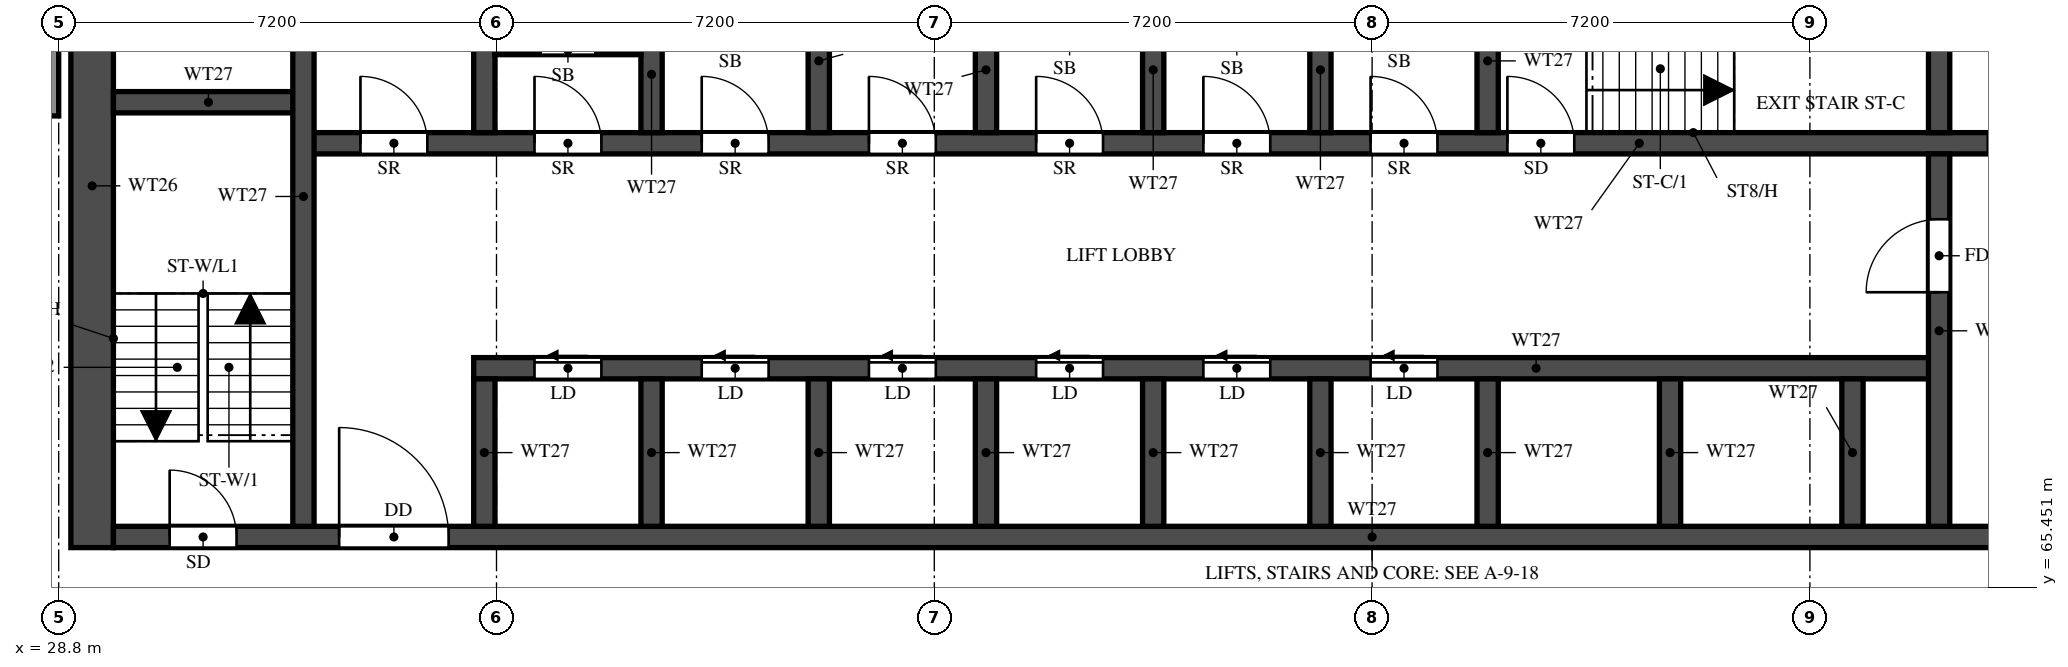
"""IFC4 building model, lengths in metres.
Left out: names, types, materials, properties, quantities, classifications, styles, units other than length and angle.
Written with IfcOpenShell. Run it as: python <this file> out.ifc"""

import sys

from ifc_helpers import new_model, si_unit, direction, frame, frame_2d, origin, place, context, subcontext, project, spatial, rectangle, extrude, element, fill, save


model = new_model("IFC4")
c1 = context("Model", 3, precision=1e-05, world=origin(), true_north=direction((0.0, 1.0)))
c2 = subcontext(c1, "Body", "Model", "MODEL_VIEW")
j1 = project(units=[si_unit("LENGTHUNIT", "METRE"), si_unit("PLANEANGLEUNIT", "RADIAN")], contexts=[c1])
p1 = place(None, origin())
s1 = spatial("IfcSite", under=j1, at=p1, CompositionType="ELEMENT")
p2 = place(p1, origin())
s2 = spatial("IfcBuilding", under=s1, at=p2, CompositionType="ELEMENT")
p3 = place(p2, frame((0.0, 0.0, 123.5)))
s3 = spatial("IfcBuildingStorey", under=s2, at=p3, CompositionType="ELEMENT", Elevation=123.5)
p4 = place(p3, frame((29.35, 66.1, 0.0), z_axis=(0.0, 0.0, 1.0), x_axis=(0.0, 1.0, 0.0)))
e1 = element("IfcWall", 1, at=p4, inside=s3, PredefinedType="SHEAR", context=c2, shape_type="SweptSolid", body=[
    extrude(rectangle(XDim=11.9, YDim=0.7, at=frame_2d((5.95, 0.0))), origin(), (0.0, 0.0, 1.0), 3.2),
])
p5 = place(p3, frame((29.7, 66.275, 0.0), z_axis=(0.0, 0.0, 1.0), x_axis=(1.0, 0.0, 0.0)))
e2 = element("IfcWall", 2, at=p5, inside=s3, PredefinedType="SHEAR", context=c2, shape_type="SweptSolid", body=[
    extrude(rectangle(XDim=41.4, YDim=0.35, at=frame_2d((20.7, 0.0))), origin(), (0.0, 0.0, 1.0), 3.2),
])
p6 = place(p5, frame((0.925, 0.0, 0.0)))
e3 = element("IfcOpeningElement", 3, at=p6, cuts=e2, PredefinedType="OPENING", context=c2, shape_type="SweptSolid", body=[
    extrude(rectangle(XDim=1.1, YDim=2.1, at=frame_2d((0.55, 1.05))), frame((0.0, 0.185, 0.0), z_axis=(0.0, -1.0, 0.0), x_axis=(1.0, 0.0, 0.0)), (0.0, 0.0, 1.0), 0.37),
])
p7 = place(p5, frame((3.712, 0.0, 0.0)))
e4 = element("IfcOpeningElement", 4, at=p7, cuts=e2, PredefinedType="OPENING", context=c2, shape_type="SweptSolid", body=[
    extrude(rectangle(XDim=1.8, YDim=2.1, at=frame_2d((0.9, 1.05))), frame((0.0, 0.185, 0.0), z_axis=(0.0, -1.0, 0.0), x_axis=(1.0, 0.0, 0.0)), (0.0, 0.0, 1.0), 0.37),
])
p8 = place(p3, frame((35.625, 69.05, 0.0), z_axis=(0.0, 0.0, 1.0), x_axis=(1.0, 0.0, 0.0)))
e5 = element("IfcWall", 5, at=p8, inside=s3, PredefinedType="SHEAR", context=c2, shape_type="SweptSolid", body=[
    extrude(rectangle(XDim=24.1, YDim=0.35, at=frame_2d((12.05, 0.0))), origin(), (0.0, 0.0, 1.0), 3.2),
])
p9 = place(p8, frame((1.0, 0.0, 0.0)))
e6 = element("IfcOpeningElement", 6, at=p9, cuts=e5, PredefinedType="OPENING", context=c2, shape_type="SweptSolid", body=[
    extrude(rectangle(XDim=1.1, YDim=2.1, at=frame_2d((0.55, 1.05))), frame((0.0, 0.185, 0.0), z_axis=(0.0, -1.0, 0.0), x_axis=(1.0, 0.0, 0.0)), (0.0, 0.0, 1.0), 0.37),
])
p10 = place(p8, frame((3.75, 0.0, 0.0)))
e7 = element("IfcOpeningElement", 7, at=p10, cuts=e5, PredefinedType="OPENING", context=c2, shape_type="SweptSolid", body=[
    extrude(rectangle(XDim=1.1, YDim=2.1, at=frame_2d((0.55, 1.05))), frame((0.0, 0.185, 0.0), z_axis=(0.0, -1.0, 0.0), x_axis=(1.0, 0.0, 0.0)), (0.0, 0.0, 1.0), 0.37),
])
p11 = place(p8, frame((6.5, 0.0, 0.0)))
e8 = element("IfcOpeningElement", 8, at=p11, cuts=e5, PredefinedType="OPENING", context=c2, shape_type="SweptSolid", body=[
    extrude(rectangle(XDim=1.1, YDim=2.1, at=frame_2d((0.55, 1.05))), frame((0.0, 0.185, 0.0), z_axis=(0.0, -1.0, 0.0), x_axis=(1.0, 0.0, 0.0)), (0.0, 0.0, 1.0), 0.37),
])
p12 = place(p8, frame((9.25, 0.0, 0.0)))
e9 = element("IfcOpeningElement", 9, at=p12, cuts=e5, PredefinedType="OPENING", context=c2, shape_type="SweptSolid", body=[
    extrude(rectangle(XDim=1.1, YDim=2.1, at=frame_2d((0.55, 1.05))), frame((0.0, 0.185, 0.0), z_axis=(0.0, -1.0, 0.0), x_axis=(1.0, 0.0, 0.0)), (0.0, 0.0, 1.0), 0.37),
])
p13 = place(p8, frame((12.0, 0.0, 0.0)))
e10 = element("IfcOpeningElement", 10, at=p13, cuts=e5, PredefinedType="OPENING", context=c2, shape_type="SweptSolid", body=[
    extrude(rectangle(XDim=1.1, YDim=2.1, at=frame_2d((0.55, 1.05))), frame((0.0, 0.185, 0.0), z_axis=(0.0, -1.0, 0.0), x_axis=(1.0, 0.0, 0.0)), (0.0, 0.0, 1.0), 0.37),
])
p14 = place(p8, frame((14.75, 0.0, 0.0)))
e11 = element("IfcOpeningElement", 11, at=p14, cuts=e5, PredefinedType="OPENING", context=c2, shape_type="SweptSolid", body=[
    extrude(rectangle(XDim=1.1, YDim=2.1, at=frame_2d((0.55, 1.05))), frame((0.0, 0.185, 0.0), z_axis=(0.0, -1.0, 0.0), x_axis=(1.0, 0.0, 0.0)), (0.0, 0.0, 1.0), 0.37),
])
p15 = place(p3, frame((32.825, 72.75, 0.0), z_axis=(0.0, 0.0, 1.0), x_axis=(1.0, 0.0, 0.0)))
e12 = element("IfcWall", 12, at=p15, inside=s3, PredefinedType="SHEAR", context=c2, shape_type="SweptSolid", body=[
    extrude(rectangle(XDim=35.15, YDim=0.35, at=frame_2d((17.575, 0.0))), origin(), (0.0, 0.0, 1.0), 3.2),
])
p16 = place(p15, frame((19.8, 0.0, 0.0)))
e13 = element("IfcOpeningElement", 13, at=p16, cuts=e12, PredefinedType="OPENING", context=c2, shape_type="SweptSolid", body=[
    extrude(rectangle(XDim=1.1, YDim=2.1, at=frame_2d((0.55, 1.05))), frame((0.0, 0.185, 0.0), z_axis=(0.0, -1.0, 0.0), x_axis=(1.0, 0.0, 0.0)), (0.0, 0.0, 1.0), 0.37),
])
p17 = place(p15, frame((27.7, 0.0, 0.0)))
e14 = element("IfcOpeningElement", 14, at=p17, cuts=e12, PredefinedType="OPENING", context=c2, shape_type="SweptSolid", body=[
    extrude(rectangle(XDim=1.1, YDim=2.1, at=frame_2d((0.55, 1.05))), frame((0.0, 0.185, 0.0), z_axis=(0.0, -1.0, 0.0), x_axis=(1.0, 0.0, 0.0)), (0.0, 0.0, 1.0), 0.37),
])
p18 = place(p15, frame((30.3, 0.0, 0.0)))
e15 = element("IfcOpeningElement", 15, at=p18, cuts=e12, PredefinedType="OPENING", context=c2, shape_type="SweptSolid", body=[
    extrude(rectangle(XDim=1.1, YDim=2.1, at=frame_2d((0.55, 1.05))), frame((0.0, 0.185, 0.0), z_axis=(0.0, -1.0, 0.0), x_axis=(1.0, 0.0, 0.0)), (0.0, 0.0, 1.0), 0.37),
])
p19 = place(p15, frame((3.8, 0.0, 0.0)))
e16 = element("IfcOpeningElement", 16, at=p19, cuts=e12, PredefinedType="OPENING", context=c2, shape_type="SweptSolid", body=[
    extrude(rectangle(XDim=1.1, YDim=2.1, at=frame_2d((0.55, 1.05))), frame((0.0, 0.185, 0.0), z_axis=(0.0, -1.0, 0.0), x_axis=(1.0, 0.0, 0.0)), (0.0, 0.0, 1.0), 0.37),
])
p20 = place(p15, frame((6.55, 0.0, 0.0)))
e17 = element("IfcOpeningElement", 17, at=p20, cuts=e12, PredefinedType="OPENING", context=c2, shape_type="SweptSolid", body=[
    extrude(rectangle(XDim=1.1, YDim=2.1, at=frame_2d((0.55, 1.05))), frame((0.0, 0.185, 0.0), z_axis=(0.0, -1.0, 0.0), x_axis=(1.0, 0.0, 0.0)), (0.0, 0.0, 1.0), 0.37),
])
p21 = place(p15, frame((9.3, 0.0, 0.0)))
e18 = element("IfcOpeningElement", 18, at=p21, cuts=e12, PredefinedType="OPENING", context=c2, shape_type="SweptSolid", body=[
    extrude(rectangle(XDim=1.1, YDim=2.1, at=frame_2d((0.55, 1.05))), frame((0.0, 0.185, 0.0), z_axis=(0.0, -1.0, 0.0), x_axis=(1.0, 0.0, 0.0)), (0.0, 0.0, 1.0), 0.37),
])
p22 = place(p15, frame((12.05, 0.0, 0.0)))
e19 = element("IfcOpeningElement", 19, at=p22, cuts=e12, PredefinedType="OPENING", context=c2, shape_type="SweptSolid", body=[
    extrude(rectangle(XDim=1.1, YDim=2.1, at=frame_2d((0.55, 1.05))), frame((0.0, 0.185, 0.0), z_axis=(0.0, -1.0, 0.0), x_axis=(1.0, 0.0, 0.0)), (0.0, 0.0, 1.0), 0.37),
])
p23 = place(p15, frame((14.8, 0.0, 0.0)))
e20 = element("IfcOpeningElement", 20, at=p23, cuts=e12, PredefinedType="OPENING", context=c2, shape_type="SweptSolid", body=[
    extrude(rectangle(XDim=1.1, YDim=2.1, at=frame_2d((0.55, 1.05))), frame((0.0, 0.185, 0.0), z_axis=(0.0, -1.0, 0.0), x_axis=(1.0, 0.0, 0.0)), (0.0, 0.0, 1.0), 0.37),
])
p24 = place(p15, frame((17.55, 0.0, 0.0)))
e21 = element("IfcOpeningElement", 21, at=p24, cuts=e12, PredefinedType="OPENING", context=c2, shape_type="SweptSolid", body=[
    extrude(rectangle(XDim=1.1, YDim=2.1, at=frame_2d((0.55, 1.05))), frame((0.0, 0.185, 0.0), z_axis=(0.0, -1.0, 0.0), x_axis=(1.0, 0.0, 0.0)), (0.0, 0.0, 1.0), 0.37),
])
p25 = place(p15, frame((0.938, 0.0, 0.0)))
e22 = element("IfcOpeningElement", 22, at=p25, cuts=e12, PredefinedType="OPENING", context=c2, shape_type="SweptSolid", body=[
    extrude(rectangle(XDim=1.1, YDim=2.1, at=frame_2d((0.55, 1.05))), frame((0.0, 0.185, 0.0), z_axis=(0.0, -1.0, 0.0), x_axis=(1.0, 0.0, 0.0)), (0.0, 0.0, 1.0), 0.37),
])
p26 = place(p3, frame((29.7, 73.425, 0.0), z_axis=(0.0, 0.0, 1.0), x_axis=(1.0, 0.0, 0.0)))
e23 = element("IfcWall", 23, at=p26, inside=s3, PredefinedType="SHEAR", context=c2, shape_type="SweptSolid", body=[
    extrude(rectangle(XDim=3.125, YDim=0.35, at=frame_2d((1.562, 0.0))), origin(), (0.0, 0.0, 1.0), 3.2),
])
p27 = place(p3, frame((32.825, 66.45, 0.0), z_axis=(0.0, 0.0, 1.0), x_axis=(0.0, 1.0, 0.0)))
e24 = element("IfcWall", 24, at=p27, inside=s3, PredefinedType="SHEAR", context=c2, shape_type="SweptSolid", body=[
    extrude(rectangle(XDim=10.85, YDim=0.35, at=frame_2d((5.425, 0.0))), origin(), (0.0, 0.0, 1.0), 3.2),
])
p28 = place(p3, frame((59.725, 66.45, 0.0), z_axis=(0.0, 0.0, 1.0), x_axis=(0.0, 1.0, 0.0)))
e25 = element("IfcWall", 25, at=p28, inside=s3, PredefinedType="SHEAR", context=c2, shape_type="SweptSolid", body=[
    extrude(rectangle(XDim=6.125, YDim=0.35, at=frame_2d((3.062, 0.0))), origin(), (0.0, 0.0, 1.0), 3.2),
])
p29 = place(p28, frame((3.85, 0.0, 0.0)))
e26 = element("IfcOpeningElement", 26, at=p29, cuts=e25, PredefinedType="OPENING", context=c2, shape_type="SweptSolid", body=[
    extrude(rectangle(XDim=1.2, YDim=2.1, at=frame_2d((0.6, 1.05))), frame((0.0, 0.185, 0.0), z_axis=(0.0, -1.0, 0.0), x_axis=(1.0, 0.0, 0.0)), (0.0, 0.0, 1.0), 0.37),
])
p30 = place(p3, frame((59.725, 72.925, 0.0), z_axis=(0.0, 0.0, 1.0), x_axis=(0.0, 1.0, 0.0)))
e27 = element("IfcWall", 27, at=p30, inside=s3, PredefinedType="SHEAR", context=c2, shape_type="SweptSolid", body=[
    extrude(rectangle(XDim=2.95, YDim=0.35, at=frame_2d((1.475, 0.0))), origin(), (0.0, 0.0, 1.0), 3.2),
])
for number, where, z_axis, x_axis in (
    (28, (35.8, 66.45, 0.0), (0.0, 0.0, 1.0), (0.0, 1.0, 0.0)),
    (29, (38.55, 66.45, 0.0), (0.0, 0.0, 1.0), (0.0, 1.0, 0.0)),
    (30, (41.3, 66.45, 0.0), (0.0, 0.0, 1.0), (0.0, 1.0, 0.0)),
    (31, (44.05, 66.45, 0.0), (0.0, 0.0, 1.0), (0.0, 1.0, 0.0)),
    (32, (46.8, 66.45, 0.0), (0.0, 0.0, 1.0), (0.0, 1.0, 0.0)),
    (33, (49.55, 66.45, 0.0), (0.0, 0.0, 1.0), (0.0, 1.0, 0.0)),
    (34, (52.3, 66.45, 0.0), (0.0, 0.0, 1.0), (0.0, 1.0, 0.0)),
    (35, (55.3, 66.45, 0.0), (0.0, 0.0, 1.0), (0.0, 1.0, 0.0)),
    (36, (58.3, 66.45, 0.0), (0.0, 0.0, 1.0), (0.0, 1.0, 0.0)),
):
    element("IfcWall", number, at=place(p3, frame(where, z_axis=z_axis, x_axis=x_axis)), inside=s3, PredefinedType="SHEAR", context=c2, shape_type="SweptSolid", body=[
        extrude(rectangle(XDim=2.425, YDim=0.35, at=frame_2d((1.212, 0.0))), origin(), (0.0, 0.0, 1.0), 3.2),
    ])
for number, where, z_axis, x_axis in (
    (37, (35.8, 72.925, 0.0), (0.0, 0.0, 1.0), (0.0, 1.0, 0.0)),
    (38, (38.55, 72.925, 0.0), (0.0, 0.0, 1.0), (0.0, 1.0, 0.0)),
    (39, (41.3, 72.925, 0.0), (0.0, 0.0, 1.0), (0.0, 1.0, 0.0)),
    (40, (44.05, 72.925, 0.0), (0.0, 0.0, 1.0), (0.0, 1.0, 0.0)),
    (41, (46.8, 72.925, 0.0), (0.0, 0.0, 1.0), (0.0, 1.0, 0.0)),
    (42, (49.55, 72.925, 0.0), (0.0, 0.0, 1.0), (0.0, 1.0, 0.0)),
    (43, (52.3, 72.925, 0.0), (0.0, 0.0, 1.0), (0.0, 1.0, 0.0)),
):
    element("IfcWall", number, at=place(p3, frame(where, z_axis=z_axis, x_axis=x_axis)), inside=s3, PredefinedType="SHEAR", context=c2, shape_type="SweptSolid", body=[
        extrude(rectangle(XDim=2.95, YDim=0.35, at=frame_2d((1.475, 0.0))), origin(), (0.0, 0.0, 1.0), 3.2),
    ])
p31 = place(p3, frame((35.975, 74.282, 0.0), z_axis=(0.0, 0.0, 1.0), x_axis=(1.0, 0.0, 0.0)))
e44 = element("IfcWall", 44, at=p31, inside=s3, PredefinedType="PARTITIONING", context=c2, shape_type="SweptSolid", body=[
    extrude(rectangle(XDim=2.4, YDim=0.15, at=frame_2d((1.2, 0.0))), origin(), (0.0, 0.0, 1.0), 3.2),
])
p32 = place(p31, frame((0.75, 0.0, 0.0)))
e45 = element("IfcOpeningElement", 45, at=p32, cuts=e44, PredefinedType="OPENING", context=c2, shape_type="SweptSolid", body=[
    extrude(rectangle(XDim=0.9, YDim=2.1, at=frame_2d((0.45, 1.05))), frame((0.0, 0.085, 0.0), z_axis=(0.0, -1.0, 0.0), x_axis=(1.0, 0.0, 0.0)), (0.0, 0.0, 1.0), 0.17),
])
p33 = place(p3, frame((28.7, 73.2, 0.0), z_axis=(0.0, 0.0, 1.0), x_axis=(0.0, 1.0, 0.0)))
e46 = element("IfcWall", 46, at=p33, inside=s3, PredefinedType="SOLIDWALL", context=c2, shape_type="SweptSolid", body=[
    extrude(rectangle(XDim=4.8, YDim=0.2, at=frame_2d((2.4, 0.0))), origin(), (0.0, 0.0, 1.0), 3.2),
])
p34 = place(p6, origin())
e47 = element("IfcDoor", 47, at=p34, inside=s3, OperationType="SINGLE_SWING_LEFT", PredefinedType="DOOR", context=c2, shape_type="SweptSolid", body=[
    extrude(rectangle(XDim=1.1, YDim=2.1, at=frame_2d((0.55, 1.05))), frame((0.0, 0.025, 0.0), z_axis=(0.0, -1.0, 0.0), x_axis=(1.0, 0.0, 0.0)), (0.0, 0.0, 1.0), 0.05),
])
fill(e3, e47)
p35 = place(p16, origin())
e48 = element("IfcDoor", 48, at=p35, inside=s3, OperationType="SINGLE_SWING_LEFT", PredefinedType="DOOR", context=c2, shape_type="SweptSolid", body=[
    extrude(rectangle(XDim=1.1, YDim=2.1, at=frame_2d((0.55, 1.05))), frame((0.0, 0.025, 0.0), z_axis=(0.0, -1.0, 0.0), x_axis=(1.0, 0.0, 0.0)), (0.0, 0.0, 1.0), 0.05),
])
fill(e13, e48)
p36 = place(p7, origin())
e49 = element("IfcDoor", 49, at=p36, inside=s3, OperationType="DOUBLE_DOOR_SINGLE_SWING", PredefinedType="DOOR", context=c2, shape_type="SweptSolid", body=[
    extrude(rectangle(XDim=1.8, YDim=2.1, at=frame_2d((0.9, 1.05))), frame((0.0, 0.025, 0.0), z_axis=(0.0, -1.0, 0.0), x_axis=(1.0, 0.0, 0.0)), (0.0, 0.0, 1.0), 0.05),
])
fill(e4, e49)
p37 = place(p29, origin())
e50 = element("IfcDoor", 50, at=p37, inside=s3, OperationType="SINGLE_SWING_LEFT", PredefinedType="DOOR", context=c2, shape_type="SweptSolid", body=[
    extrude(rectangle(XDim=1.2, YDim=2.1, at=frame_2d((0.6, 1.05))), frame((0.0, 0.025, 0.0), z_axis=(0.0, -1.0, 0.0), x_axis=(1.0, 0.0, 0.0)), (0.0, 0.0, 1.0), 0.05),
])
fill(e26, e50)
p38 = place(p17, origin())
e51 = element("IfcDoor", 51, at=p38, inside=s3, OperationType="SLIDING_TO_LEFT", PredefinedType="DOOR", context=c2, shape_type="SweptSolid", body=[
    extrude(rectangle(XDim=1.1, YDim=2.1, at=frame_2d((0.55, 1.05))), frame((0.0, 0.025, 0.0), z_axis=(0.0, -1.0, 0.0), x_axis=(1.0, 0.0, 0.0)), (0.0, 0.0, 1.0), 0.05),
])
fill(e14, e51)
p39 = place(p9, origin())
e52 = element("IfcDoor", 52, at=p39, inside=s3, OperationType="SLIDING_TO_LEFT", PredefinedType="DOOR", context=c2, shape_type="SweptSolid", body=[
    extrude(rectangle(XDim=1.1, YDim=2.1, at=frame_2d((0.55, 1.05))), frame((0.0, 0.025, 0.0), z_axis=(0.0, -1.0, 0.0), x_axis=(1.0, 0.0, 0.0)), (0.0, 0.0, 1.0), 0.05),
])
fill(e6, e52)
p40 = place(p10, origin())
e53 = element("IfcDoor", 53, at=p40, inside=s3, OperationType="SLIDING_TO_LEFT", PredefinedType="DOOR", context=c2, shape_type="SweptSolid", body=[
    extrude(rectangle(XDim=1.1, YDim=2.1, at=frame_2d((0.55, 1.05))), frame((0.0, 0.025, 0.0), z_axis=(0.0, -1.0, 0.0), x_axis=(1.0, 0.0, 0.0)), (0.0, 0.0, 1.0), 0.05),
])
fill(e7, e53)
p41 = place(p11, origin())
e54 = element("IfcDoor", 54, at=p41, inside=s3, OperationType="SLIDING_TO_LEFT", PredefinedType="DOOR", context=c2, shape_type="SweptSolid", body=[
    extrude(rectangle(XDim=1.1, YDim=2.1, at=frame_2d((0.55, 1.05))), frame((0.0, 0.025, 0.0), z_axis=(0.0, -1.0, 0.0), x_axis=(1.0, 0.0, 0.0)), (0.0, 0.0, 1.0), 0.05),
])
fill(e8, e54)
p42 = place(p12, origin())
e55 = element("IfcDoor", 55, at=p42, inside=s3, OperationType="SLIDING_TO_LEFT", PredefinedType="DOOR", context=c2, shape_type="SweptSolid", body=[
    extrude(rectangle(XDim=1.1, YDim=2.1, at=frame_2d((0.55, 1.05))), frame((0.0, 0.025, 0.0), z_axis=(0.0, -1.0, 0.0), x_axis=(1.0, 0.0, 0.0)), (0.0, 0.0, 1.0), 0.05),
])
fill(e9, e55)
p43 = place(p13, origin())
e56 = element("IfcDoor", 56, at=p43, inside=s3, OperationType="SLIDING_TO_LEFT", PredefinedType="DOOR", context=c2, shape_type="SweptSolid", body=[
    extrude(rectangle(XDim=1.1, YDim=2.1, at=frame_2d((0.55, 1.05))), frame((0.0, 0.025, 0.0), z_axis=(0.0, -1.0, 0.0), x_axis=(1.0, 0.0, 0.0)), (0.0, 0.0, 1.0), 0.05),
])
fill(e10, e56)
p44 = place(p14, origin())
e57 = element("IfcDoor", 57, at=p44, inside=s3, OperationType="SLIDING_TO_LEFT", PredefinedType="DOOR", context=c2, shape_type="SweptSolid", body=[
    extrude(rectangle(XDim=1.1, YDim=2.1, at=frame_2d((0.55, 1.05))), frame((0.0, 0.025, 0.0), z_axis=(0.0, -1.0, 0.0), x_axis=(1.0, 0.0, 0.0)), (0.0, 0.0, 1.0), 0.05),
])
fill(e11, e57)
p45 = place(p19, origin())
e58 = element("IfcDoor", 58, at=p45, inside=s3, OperationType="SINGLE_SWING_LEFT", PredefinedType="DOOR", context=c2, shape_type="SweptSolid", body=[
    extrude(rectangle(XDim=1.1, YDim=2.1, at=frame_2d((0.55, 1.05))), frame((0.0, 0.025, 0.0), z_axis=(0.0, -1.0, 0.0), x_axis=(1.0, 0.0, 0.0)), (0.0, 0.0, 1.0), 0.05),
])
fill(e16, e58)
p46 = place(p20, origin())
e59 = element("IfcDoor", 59, at=p46, inside=s3, OperationType="SINGLE_SWING_RIGHT", PredefinedType="DOOR", context=c2, shape_type="SweptSolid", body=[
    extrude(rectangle(XDim=1.1, YDim=2.1, at=frame_2d((0.55, 1.05))), frame((0.0, 0.025, 0.0), z_axis=(0.0, -1.0, 0.0), x_axis=(1.0, 0.0, 0.0)), (0.0, 0.0, 1.0), 0.05),
])
fill(e17, e59)
p47 = place(p21, origin())
e60 = element("IfcDoor", 60, at=p47, inside=s3, OperationType="SINGLE_SWING_LEFT", PredefinedType="DOOR", context=c2, shape_type="SweptSolid", body=[
    extrude(rectangle(XDim=1.1, YDim=2.1, at=frame_2d((0.55, 1.05))), frame((0.0, 0.025, 0.0), z_axis=(0.0, -1.0, 0.0), x_axis=(1.0, 0.0, 0.0)), (0.0, 0.0, 1.0), 0.05),
])
fill(e18, e60)
p48 = place(p22, origin())
e61 = element("IfcDoor", 61, at=p48, inside=s3, OperationType="SINGLE_SWING_RIGHT", PredefinedType="DOOR", context=c2, shape_type="SweptSolid", body=[
    extrude(rectangle(XDim=1.1, YDim=2.1, at=frame_2d((0.55, 1.05))), frame((0.0, 0.025, 0.0), z_axis=(0.0, -1.0, 0.0), x_axis=(1.0, 0.0, 0.0)), (0.0, 0.0, 1.0), 0.05),
])
fill(e19, e61)
p49 = place(p23, origin())
e62 = element("IfcDoor", 62, at=p49, inside=s3, OperationType="SINGLE_SWING_LEFT", PredefinedType="DOOR", context=c2, shape_type="SweptSolid", body=[
    extrude(rectangle(XDim=1.1, YDim=2.1, at=frame_2d((0.55, 1.05))), frame((0.0, 0.025, 0.0), z_axis=(0.0, -1.0, 0.0), x_axis=(1.0, 0.0, 0.0)), (0.0, 0.0, 1.0), 0.05),
])
fill(e20, e62)
p50 = place(p24, origin())
e63 = element("IfcDoor", 63, at=p50, inside=s3, OperationType="SINGLE_SWING_RIGHT", PredefinedType="DOOR", context=c2, shape_type="SweptSolid", body=[
    extrude(rectangle(XDim=1.1, YDim=2.1, at=frame_2d((0.55, 1.05))), frame((0.0, 0.025, 0.0), z_axis=(0.0, -1.0, 0.0), x_axis=(1.0, 0.0, 0.0)), (0.0, 0.0, 1.0), 0.05),
])
fill(e21, e63)
p51 = place(p25, origin())
e64 = element("IfcDoor", 64, at=p51, inside=s3, OperationType="SINGLE_SWING_LEFT", PredefinedType="DOOR", context=c2, shape_type="SweptSolid", body=[
    extrude(rectangle(XDim=1.1, YDim=2.1, at=frame_2d((0.55, 1.05))), frame((0.0, 0.025, 0.0), z_axis=(0.0, -1.0, 0.0), x_axis=(1.0, 0.0, 0.0)), (0.0, 0.0, 1.0), 0.05),
])
fill(e22, e64)
save(model, sys.argv[1])
